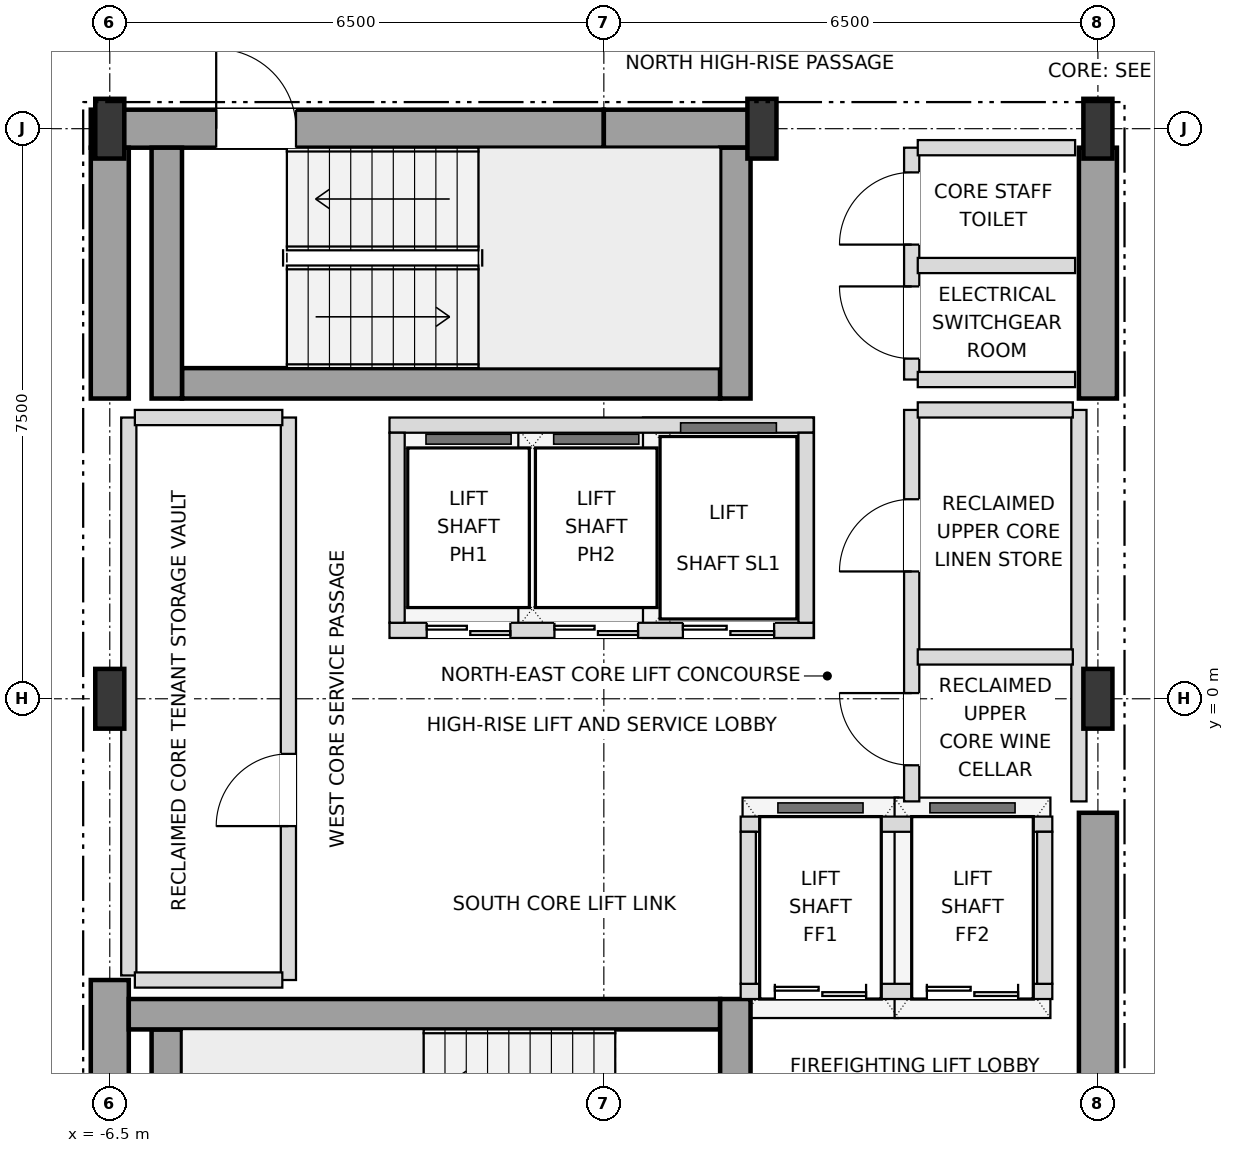
"""IFC4 building model, lengths in metres.
Left out: names, types, materials, properties, quantities, classifications, styles, units other than length and angle.
Written with IfcOpenShell. Run it as: python <this file> out.ifc"""

import sys

from ifc_helpers import new_model, si_unit, direction, frame, frame_2d, origin, origin_2d, place, context, subcontext, project, spatial, rectangle, i_section, extrude, element, fill, save


model = new_model("IFC4")
c1 = context("Model", 3, precision=1e-05, world=origin(), true_north=direction((0.0, 1.0)))
c2 = subcontext(c1, "Body", "Model", "MODEL_VIEW")
j1 = project(units=[si_unit("LENGTHUNIT", "METRE"), si_unit("PLANEANGLEUNIT", "RADIAN")], contexts=[c1])
p1 = place(None, origin())
s1 = spatial("IfcSite", under=j1, at=p1, CompositionType="ELEMENT")
p2 = place(p1, origin())
s2 = spatial("IfcBuilding", under=s1, at=p2, CompositionType="ELEMENT")
p3 = place(p2, frame((0.0, 0.0, 225.9)))
s3 = spatial("IfcBuildingStorey", under=s2, at=p3, CompositionType="ELEMENT", Elevation=225.9)
for number, where, z_axis, x_axis in (
    (1, (-6.5, 0.0, 0.0), (0.0, 0.0, 1.0), (1.0, 0.0, 0.0)),
    (2, (6.5, 0.0, 0.0), (0.0, 0.0, 1.0), (1.0, 0.0, 0.0)),
    (3, (-6.5, 7.5, 0.0), (0.0, 0.0, 1.0), (1.0, 0.0, 0.0)),
    (4, (2.08, 7.5, 0.0), (0.0, 0.0, 1.0), (1.0, 0.0, 0.0)),
    (5, (6.5, 7.5, 0.0), (0.0, 0.0, 1.0), (1.0, 0.0, 0.0)),
):
    element("IfcColumn", number, at=place(p3, frame(where, z_axis=z_axis, x_axis=x_axis)), inside=s3, PredefinedType="COLUMN", context=c2, shape_type="SweptSolid", body=[
        extrude(i_section(OverallWidth=0.382, OverallDepth=0.786, WebThickness=0.02, FlangeThickness=0.033, at=origin_2d()), origin(), (0.0, 0.0, 1.0), 3.6),
    ])
p4 = place(p3, frame((-6.75, 7.5, 0.0), z_axis=(0.0, 0.0, 1.0), x_axis=(1.0, 0.0, 0.0)))
e6 = element("IfcWall", 6, at=p4, inside=s3, PredefinedType="SHEAR", context=c2, shape_type="SweptSolid", body=[
    extrude(rectangle(XDim=6.75, YDim=0.5, at=frame_2d((3.375, 0.0))), origin(), (0.0, 0.0, 1.0), 3.38),
])
p5 = place(p4, frame((1.65, 0.0, 0.0)))
e7 = element("IfcOpeningElement", 7, at=p5, cuts=e6, PredefinedType="OPENING", context=c2, shape_type="SweptSolid", body=[
    extrude(rectangle(XDim=1.05, YDim=2.15, at=frame_2d((0.525, 1.075))), frame((0.0, 0.26, 0.0), z_axis=(0.0, -1.0, 0.0), x_axis=(1.0, 0.0, 0.0)), (0.0, 0.0, 1.0), 0.52),
])
p6 = place(p3, frame((0.0, 7.5, 0.0), z_axis=(0.0, 0.0, 1.0), x_axis=(1.0, 0.0, 0.0)))
e8 = element("IfcWall", 8, at=p6, inside=s3, PredefinedType="SHEAR", context=c2, shape_type="SweptSolid", body=[
    extrude(rectangle(XDim=2.08, YDim=0.5, at=frame_2d((1.04, 0.0))), origin(), (0.0, 0.0, 1.0), 3.38),
])
p7 = place(p3, frame((-6.5, -7.25, 0.0), z_axis=(0.0, 0.0, 1.0), x_axis=(0.0, 1.0, 0.0)))
e9 = element("IfcWall", 9, at=p7, inside=s3, PredefinedType="SHEAR", context=c2, shape_type="SweptSolid", body=[
    extrude(rectangle(XDim=3.55, YDim=0.5, at=frame_2d((1.775, 0.0))), origin(), (0.0, 0.0, 1.0), 3.38),
])
p8 = place(p3, frame((-6.5, 3.95, 0.0), z_axis=(0.0, 0.0, 1.0), x_axis=(0.0, 1.0, 0.0)))
e10 = element("IfcWall", 10, at=p8, inside=s3, PredefinedType="SHEAR", context=c2, shape_type="SweptSolid", body=[
    extrude(rectangle(XDim=3.3, YDim=0.5, at=frame_2d((1.65, 0.0))), origin(), (0.0, 0.0, 1.0), 3.38),
])
p9 = place(p3, frame((6.5, -7.25, 0.0), z_axis=(0.0, 0.0, 1.0), x_axis=(0.0, 1.0, 0.0)))
e11 = element("IfcWall", 11, at=p9, inside=s3, PredefinedType="SHEAR", context=c2, shape_type="SweptSolid", body=[
    extrude(rectangle(XDim=5.75, YDim=0.5, at=frame_2d((2.875, 0.0))), origin(), (0.0, 0.0, 1.0), 3.38),
])
p10 = place(p9, frame((0.85, 0.0, 0.0)))
e12 = element("IfcOpeningElement", 12, at=p10, cuts=e11, PredefinedType="OPENING", context=c2, shape_type="SweptSolid", body=[
    extrude(rectangle(XDim=1.05, YDim=2.15, at=frame_2d((0.525, 1.075))), frame((0.0, 0.26, 0.0), z_axis=(0.0, -1.0, 0.0), x_axis=(1.0, 0.0, 0.0)), (0.0, 0.0, 1.0), 0.52),
])
p11 = place(p3, frame((6.5, 3.95, 0.0), z_axis=(0.0, 0.0, 1.0), x_axis=(0.0, 1.0, 0.0)))
e13 = element("IfcWall", 13, at=p11, inside=s3, PredefinedType="SHEAR", context=c2, shape_type="SweptSolid", body=[
    extrude(rectangle(XDim=3.3, YDim=0.5, at=frame_2d((1.65, 0.0))), origin(), (0.0, 0.0, 1.0), 3.38),
])
p12 = place(p3, frame((-5.75, -7.25, 0.0), z_axis=(0.0, 0.0, 1.0), x_axis=(0.0, 1.0, 0.0)))
e14 = element("IfcWall", 14, at=p12, inside=s3, PredefinedType="SHEAR", context=c2, shape_type="SweptSolid", body=[
    extrude(rectangle(XDim=2.9, YDim=0.4, at=frame_2d((1.45, 0.0))), origin(), (0.0, 0.0, 1.0), 3.38),
])
p13 = place(p3, frame((-6.25, -4.15, 0.0), z_axis=(0.0, 0.0, 1.0), x_axis=(1.0, 0.0, 0.0)))
e15 = element("IfcWall", 15, at=p13, inside=s3, PredefinedType="SHEAR", context=c2, shape_type="SweptSolid", body=[
    extrude(rectangle(XDim=7.78, YDim=0.4, at=frame_2d((3.89, 0.0))), origin(), (0.0, 0.0, 1.0), 3.38),
])
p14 = place(p3, frame((1.73, -7.25, 0.0), z_axis=(0.0, 0.0, 1.0), x_axis=(0.0, 1.0, 0.0)))
e16 = element("IfcWall", 16, at=p14, inside=s3, PredefinedType="SHEAR", context=c2, shape_type="SweptSolid", body=[
    extrude(rectangle(XDim=3.3, YDim=0.4, at=frame_2d((1.65, 0.0))), origin(), (0.0, 0.0, 1.0), 3.38),
])
p15 = place(p14, frame((0.9, 0.0, 0.0)))
e17 = element("IfcOpeningElement", 17, at=p15, cuts=e16, PredefinedType="OPENING", context=c2, shape_type="SweptSolid", body=[
    extrude(rectangle(XDim=1.05, YDim=2.15, at=frame_2d((0.525, 1.075))), frame((0.0, 0.21, 0.0), z_axis=(0.0, -1.0, 0.0), x_axis=(1.0, 0.0, 0.0)), (0.0, 0.0, 1.0), 0.42),
])
p16 = place(p3, frame((-5.55, 4.15, 0.0), z_axis=(0.0, 0.0, 1.0), x_axis=(1.0, 0.0, 0.0)))
e18 = element("IfcWall", 18, at=p16, inside=s3, PredefinedType="SHEAR", context=c2, shape_type="SweptSolid", body=[
    extrude(rectangle(XDim=7.08, YDim=0.4, at=frame_2d((3.54, 0.0))), origin(), (0.0, 0.0, 1.0), 3.38),
])
for number, where, z_axis, x_axis in (
    (19, (1.73, 3.95, 0.0), (0.0, 0.0, 1.0), (0.0, 1.0, 0.0)),
    (20, (-5.75, 3.95, 0.0), (0.0, 0.0, 1.0), (0.0, 1.0, 0.0)),
):
    element("IfcWall", number, at=place(p3, frame(where, z_axis=z_axis, x_axis=x_axis)), inside=s3, PredefinedType="SHEAR", context=c2, shape_type="SweptSolid", body=[
        extrude(rectangle(XDim=3.3, YDim=0.4, at=frame_2d((1.65, 0.0))), origin(), (0.0, 0.0, 1.0), 3.38),
    ])
p17 = place(p3, frame((-2.82, 0.9, 0.0), z_axis=(0.0, 0.0, 1.0), x_axis=(1.0, 0.0, 0.0)))
e21 = element("IfcWall", 21, at=p17, inside=s3, PredefinedType="SOLIDWALL", context=c2, shape_type="SweptSolid", body=[
    extrude(rectangle(XDim=5.58, YDim=0.2, at=frame_2d((2.79, 0.0))), origin(), (0.0, 0.0, 1.0), 3.38),
])
p18 = place(p17, frame((0.49, 0.0, 0.0)))
e22 = element("IfcOpeningElement", 22, at=p18, cuts=e21, PredefinedType="OPENING", context=c2, shape_type="SweptSolid", body=[
    extrude(rectangle(XDim=1.1, YDim=2.15, at=frame_2d((0.55, 1.075))), frame((0.0, 0.11, 0.0), z_axis=(0.0, -1.0, 0.0), x_axis=(1.0, 0.0, 0.0)), (0.0, 0.0, 1.0), 0.22),
])
p19 = place(p17, frame((2.17, 0.0, 0.0)))
e23 = element("IfcOpeningElement", 23, at=p19, cuts=e21, PredefinedType="OPENING", context=c2, shape_type="SweptSolid", body=[
    extrude(rectangle(XDim=1.1, YDim=2.15, at=frame_2d((0.55, 1.075))), frame((0.0, 0.11, 0.0), z_axis=(0.0, -1.0, 0.0), x_axis=(1.0, 0.0, 0.0)), (0.0, 0.0, 1.0), 0.22),
])
p20 = place(p17, frame((3.86, 0.0, 0.0)))
e24 = element("IfcOpeningElement", 24, at=p20, cuts=e21, PredefinedType="OPENING", context=c2, shape_type="SweptSolid", body=[
    extrude(rectangle(XDim=1.2, YDim=2.2, at=frame_2d((0.6, 1.1))), frame((0.0, 0.11, 0.0), z_axis=(0.0, -1.0, 0.0), x_axis=(1.0, 0.0, 0.0)), (0.0, 0.0, 1.0), 0.22),
])
p21 = place(p3, frame((-2.82, 3.6, 0.0), z_axis=(0.0, 0.0, 1.0), x_axis=(1.0, 0.0, 0.0)))
e25 = element("IfcWall", 25, at=p21, inside=s3, PredefinedType="SOLIDWALL", context=c2, shape_type="SweptSolid", body=[
    extrude(rectangle(XDim=5.58, YDim=0.2, at=frame_2d((2.79, 0.0))), origin(), (0.0, 0.0, 1.0), 3.38),
])
for number, where, z_axis, x_axis in (
    (26, (-2.72, 1.0, 0.0), (0.0, 0.0, 1.0), (0.0, 1.0, 0.0)),
    (27, (2.66, 1.0, 0.0), (0.0, 0.0, 1.0), (0.0, 1.0, 0.0)),
):
    element("IfcWall", number, at=place(p3, frame(where, z_axis=z_axis, x_axis=x_axis)), inside=s3, PredefinedType="SOLIDWALL", context=c2, shape_type="SweptSolid", body=[
        extrude(rectangle(XDim=2.5, YDim=0.2, at=frame_2d((1.25, 0.0))), origin(), (0.0, 0.0, 1.0), 3.38),
    ])
p22 = place(p3, frame((1.8, -3.85, 0.0), z_axis=(0.0, 0.0, 1.0), x_axis=(1.0, 0.0, 0.0)))
e28 = element("IfcWall", 28, at=p22, inside=s3, PredefinedType="SOLIDWALL", context=c2, shape_type="SweptSolid", body=[
    extrude(rectangle(XDim=4.1, YDim=0.2, at=frame_2d((2.05, 0.0))), origin(), (0.0, 0.0, 1.0), 3.38),
])
p23 = place(p22, frame((0.45, 0.0, 0.0)))
e29 = element("IfcOpeningElement", 29, at=p23, cuts=e28, PredefinedType="OPENING", context=c2, shape_type="SweptSolid", body=[
    extrude(rectangle(XDim=1.2, YDim=2.2, at=frame_2d((0.6, 1.1))), frame((0.0, 0.11, 0.0), z_axis=(0.0, -1.0, 0.0), x_axis=(1.0, 0.0, 0.0)), (0.0, 0.0, 1.0), 0.22),
])
p24 = place(p22, frame((2.45, 0.0, 0.0)))
e30 = element("IfcOpeningElement", 30, at=p24, cuts=e28, PredefinedType="OPENING", context=c2, shape_type="SweptSolid", body=[
    extrude(rectangle(XDim=1.2, YDim=2.2, at=frame_2d((0.6, 1.1))), frame((0.0, 0.11, 0.0), z_axis=(0.0, -1.0, 0.0), x_axis=(1.0, 0.0, 0.0)), (0.0, 0.0, 1.0), 0.22),
])
p25 = place(p3, frame((1.8, -1.65, 0.0), z_axis=(0.0, 0.0, 1.0), x_axis=(1.0, 0.0, 0.0)))
e31 = element("IfcWall", 31, at=p25, inside=s3, PredefinedType="SOLIDWALL", context=c2, shape_type="SweptSolid", body=[
    extrude(rectangle(XDim=4.1, YDim=0.2, at=frame_2d((2.05, 0.0))), origin(), (0.0, 0.0, 1.0), 3.38),
])
for number, where, z_axis, x_axis in (
    (32, (1.9, -3.75, 0.0), (0.0, 0.0, 1.0), (0.0, 1.0, 0.0)),
    (33, (5.8, -3.75, 0.0), (0.0, 0.0, 1.0), (0.0, 1.0, 0.0)),
):
    element("IfcWall", number, at=place(p3, frame(where, z_axis=z_axis, x_axis=x_axis)), inside=s3, PredefinedType="SOLIDWALL", context=c2, shape_type="SweptSolid", body=[
        extrude(rectangle(XDim=2.0, YDim=0.2, at=frame_2d((1.0, 0.0))), origin(), (0.0, 0.0, 1.0), 3.38),
    ])
p26 = place(p3, frame((-6.25, -3.64, 0.0), z_axis=(0.0, 0.0, 1.0), x_axis=(0.0, 1.0, 0.0)))
e34 = element("IfcWall", 34, at=p26, inside=s3, PredefinedType="SOLIDWALL", context=c2, shape_type="SweptSolid", body=[
    extrude(rectangle(XDim=7.34, YDim=0.2, at=frame_2d((3.67, 0.0))), origin(), (0.0, 0.0, 1.0), 3.38),
])
p27 = place(p3, frame((-4.15, -3.7, 0.0), z_axis=(0.0, 0.0, 1.0), x_axis=(0.0, 1.0, 0.0)))
e35 = element("IfcWall", 35, at=p27, inside=s3, PredefinedType="SOLIDWALL", context=c2, shape_type="SweptSolid", body=[
    extrude(rectangle(XDim=7.4, YDim=0.2, at=frame_2d((3.7, 0.0))), origin(), (0.0, 0.0, 1.0), 3.38),
])
p28 = place(p27, frame((2.025, 0.0, 0.0)))
e36 = element("IfcOpeningElement", 36, at=p28, cuts=e35, PredefinedType="OPENING", context=c2, shape_type="SweptSolid", body=[
    extrude(rectangle(XDim=0.95, YDim=2.15, at=frame_2d((0.475, 1.075))), frame((0.0, 0.11, 0.0), z_axis=(0.0, -1.0, 0.0), x_axis=(1.0, 0.0, 0.0)), (0.0, 0.0, 1.0), 0.22),
])
p29 = place(p3, frame((4.05, -1.35, 0.0), z_axis=(0.0, 0.0, 1.0), x_axis=(0.0, 1.0, 0.0)))
e37 = element("IfcWall", 37, at=p29, inside=s3, PredefinedType="SOLIDWALL", context=c2, shape_type="SweptSolid", body=[
    extrude(rectangle(XDim=5.15, YDim=0.2, at=frame_2d((2.575, 0.0))), origin(), (0.0, 0.0, 1.0), 3.38),
])
p30 = place(p29, frame((0.475, 0.0, 0.0)))
e38 = element("IfcOpeningElement", 38, at=p30, cuts=e37, PredefinedType="OPENING", context=c2, shape_type="SweptSolid", body=[
    extrude(rectangle(XDim=0.95, YDim=2.15, at=frame_2d((0.475, 1.075))), frame((0.0, 0.11, 0.0), z_axis=(0.0, -1.0, 0.0), x_axis=(1.0, 0.0, 0.0)), (0.0, 0.0, 1.0), 0.22),
])
p31 = place(p29, frame((3.025, 0.0, 0.0)))
e39 = element("IfcOpeningElement", 39, at=p31, cuts=e37, PredefinedType="OPENING", context=c2, shape_type="SweptSolid", body=[
    extrude(rectangle(XDim=0.95, YDim=2.15, at=frame_2d((0.475, 1.075))), frame((0.0, 0.11, 0.0), z_axis=(0.0, -1.0, 0.0), x_axis=(1.0, 0.0, 0.0)), (0.0, 0.0, 1.0), 0.22),
])
p32 = place(p3, frame((4.05, 4.2, 0.0), z_axis=(0.0, 0.0, 1.0), x_axis=(0.0, 1.0, 0.0)))
e40 = element("IfcWall", 40, at=p32, inside=s3, PredefinedType="SOLIDWALL", context=c2, shape_type="SweptSolid", body=[
    extrude(rectangle(XDim=3.05, YDim=0.2, at=frame_2d((1.525, 0.0))), origin(), (0.0, 0.0, 1.0), 3.38),
])
p33 = place(p32, frame((0.275, 0.0, 0.0)))
e41 = element("IfcOpeningElement", 41, at=p33, cuts=e40, PredefinedType="OPENING", context=c2, shape_type="SweptSolid", body=[
    extrude(rectangle(XDim=0.95, YDim=2.15, at=frame_2d((0.475, 1.075))), frame((0.0, 0.11, 0.0), z_axis=(0.0, -1.0, 0.0), x_axis=(1.0, 0.0, 0.0)), (0.0, 0.0, 1.0), 0.22),
])
p34 = place(p32, frame((1.775, 0.0, 0.0)))
e42 = element("IfcOpeningElement", 42, at=p34, cuts=e40, PredefinedType="OPENING", context=c2, shape_type="SweptSolid", body=[
    extrude(rectangle(XDim=0.95, YDim=2.15, at=frame_2d((0.475, 1.075))), frame((0.0, 0.11, 0.0), z_axis=(0.0, -1.0, 0.0), x_axis=(1.0, 0.0, 0.0)), (0.0, 0.0, 1.0), 0.22),
])
p35 = place(p3, frame((6.25, -1.35, 0.0), z_axis=(0.0, 0.0, 1.0), x_axis=(0.0, 1.0, 0.0)))
e43 = element("IfcWall", 43, at=p35, inside=s3, PredefinedType="SOLIDWALL", context=c2, shape_type="SweptSolid", body=[
    extrude(rectangle(XDim=5.15, YDim=0.2, at=frame_2d((2.575, 0.0))), origin(), (0.0, 0.0, 1.0), 3.38),
])
p36 = place(p3, frame((-6.17, -3.7, 0.0), z_axis=(0.0, 0.0, 1.0), x_axis=(1.0, 0.0, 0.0)))
e44 = element("IfcWall", 44, at=p36, inside=s3, PredefinedType="SOLIDWALL", context=c2, shape_type="SweptSolid", body=[
    extrude(rectangle(XDim=1.94, YDim=0.2, at=frame_2d((0.97, 0.0))), origin(), (0.0, 0.0, 1.0), 3.38),
])
p37 = place(p3, frame((4.13, 0.55, 0.0), z_axis=(0.0, 0.0, 1.0), x_axis=(1.0, 0.0, 0.0)))
e45 = element("IfcWall", 45, at=p37, inside=s3, PredefinedType="SOLIDWALL", context=c2, shape_type="SweptSolid", body=[
    extrude(rectangle(XDim=2.04, YDim=0.2, at=frame_2d((1.02, 0.0))), origin(), (0.0, 0.0, 1.0), 3.38),
])
p38 = place(p3, frame((-6.17, 3.7, 0.0), z_axis=(0.0, 0.0, 1.0), x_axis=(1.0, 0.0, 0.0)))
e46 = element("IfcWall", 46, at=p38, inside=s3, PredefinedType="SOLIDWALL", context=c2, shape_type="SweptSolid", body=[
    extrude(rectangle(XDim=1.94, YDim=0.2, at=frame_2d((0.97, 0.0))), origin(), (0.0, 0.0, 1.0), 3.38),
])
p39 = place(p3, frame((4.13, 3.8, 0.0), z_axis=(0.0, 0.0, 1.0), x_axis=(1.0, 0.0, 0.0)))
e47 = element("IfcWall", 47, at=p39, inside=s3, PredefinedType="SOLIDWALL", context=c2, shape_type="SweptSolid", body=[
    extrude(rectangle(XDim=2.04, YDim=0.2, at=frame_2d((1.02, 0.0))), origin(), (0.0, 0.0, 1.0), 3.38),
])
for number, where, z_axis, x_axis in (
    (48, (4.13, 4.2, 0.0), (0.0, 0.0, 1.0), (1.0, 0.0, 0.0)),
    (49, (4.13, 5.7, 0.0), (0.0, 0.0, 1.0), (1.0, 0.0, 0.0)),
    (50, (4.13, 7.25, 0.0), (0.0, 0.0, 1.0), (1.0, 0.0, 0.0)),
):
    element("IfcWall", number, at=place(p3, frame(where, z_axis=z_axis, x_axis=x_axis)), inside=s3, PredefinedType="SOLIDWALL", context=c2, shape_type="SweptSolid", body=[
        extrude(rectangle(XDim=2.07, YDim=0.2, at=frame_2d((1.035, 0.0))), origin(), (0.0, 0.0, 1.0), 3.38),
    ])
p40 = place(p5, origin())
e51 = element("IfcDoor", 51, at=p40, inside=s3, OperationType="SINGLE_SWING_LEFT", PredefinedType="DOOR", context=c2, shape_type="SweptSolid", body=[
    extrude(rectangle(XDim=1.05, YDim=2.15, at=frame_2d((0.525, 1.075))), frame((0.0, 0.025, 0.0), z_axis=(0.0, -1.0, 0.0), x_axis=(1.0, 0.0, 0.0)), (0.0, 0.0, 1.0), 0.05),
])
fill(e7, e51)
p41 = place(p18, origin())
e52 = element("IfcDoor", 52, at=p41, inside=s3, OperationType="DOUBLE_DOOR_SLIDING", PredefinedType="DOOR", context=c2, shape_type="SweptSolid", body=[
    extrude(rectangle(XDim=1.1, YDim=2.15, at=frame_2d((0.55, 1.075))), frame((0.0, 0.025, 0.0), z_axis=(0.0, -1.0, 0.0), x_axis=(1.0, 0.0, 0.0)), (0.0, 0.0, 1.0), 0.05),
])
fill(e22, e52)
p42 = place(p19, origin())
e53 = element("IfcDoor", 53, at=p42, inside=s3, OperationType="DOUBLE_DOOR_SLIDING", PredefinedType="DOOR", context=c2, shape_type="SweptSolid", body=[
    extrude(rectangle(XDim=1.1, YDim=2.15, at=frame_2d((0.55, 1.075))), frame((0.0, 0.025, 0.0), z_axis=(0.0, -1.0, 0.0), x_axis=(1.0, 0.0, 0.0)), (0.0, 0.0, 1.0), 0.05),
])
fill(e23, e53)
p43 = place(p20, origin())
e54 = element("IfcDoor", 54, at=p43, inside=s3, OperationType="DOUBLE_DOOR_SLIDING", PredefinedType="DOOR", context=c2, shape_type="SweptSolid", body=[
    extrude(rectangle(XDim=1.2, YDim=2.2, at=frame_2d((0.6, 1.1))), frame((0.0, 0.025, 0.0), z_axis=(0.0, -1.0, 0.0), x_axis=(1.0, 0.0, 0.0)), (0.0, 0.0, 1.0), 0.05),
])
fill(e24, e54)
p44 = place(p23, origin())
e55 = element("IfcDoor", 55, at=p44, inside=s3, OperationType="DOUBLE_DOOR_SLIDING", PredefinedType="DOOR", context=c2, shape_type="SweptSolid", body=[
    extrude(rectangle(XDim=1.2, YDim=2.2, at=frame_2d((0.6, 1.1))), frame((0.0, 0.025, 0.0), z_axis=(0.0, -1.0, 0.0), x_axis=(1.0, 0.0, 0.0)), (0.0, 0.0, 1.0), 0.05),
])
fill(e29, e55)
p45 = place(p24, origin())
e56 = element("IfcDoor", 56, at=p45, inside=s3, OperationType="DOUBLE_DOOR_SLIDING", PredefinedType="DOOR", context=c2, shape_type="SweptSolid", body=[
    extrude(rectangle(XDim=1.2, YDim=2.2, at=frame_2d((0.6, 1.1))), frame((0.0, 0.025, 0.0), z_axis=(0.0, -1.0, 0.0), x_axis=(1.0, 0.0, 0.0)), (0.0, 0.0, 1.0), 0.05),
])
fill(e30, e56)
p46 = place(p28, origin())
e57 = element("IfcDoor", 57, at=p46, inside=s3, OperationType="SINGLE_SWING_LEFT", PredefinedType="DOOR", context=c2, shape_type="SweptSolid", body=[
    extrude(rectangle(XDim=0.95, YDim=2.15, at=frame_2d((0.475, 1.075))), frame((0.0, 0.025, 0.0), z_axis=(0.0, -1.0, 0.0), x_axis=(1.0, 0.0, 0.0)), (0.0, 0.0, 1.0), 0.05),
])
fill(e36, e57)
p47 = place(p30, origin())
e58 = element("IfcDoor", 58, at=p47, inside=s3, OperationType="SINGLE_SWING_RIGHT", PredefinedType="DOOR", context=c2, shape_type="SweptSolid", body=[
    extrude(rectangle(XDim=0.95, YDim=2.15, at=frame_2d((0.475, 1.075))), frame((0.0, 0.025, 0.0), z_axis=(0.0, -1.0, 0.0), x_axis=(1.0, 0.0, 0.0)), (0.0, 0.0, 1.0), 0.05),
])
fill(e38, e58)
p48 = place(p31, origin())
e59 = element("IfcDoor", 59, at=p48, inside=s3, OperationType="SINGLE_SWING_LEFT", PredefinedType="DOOR", context=c2, shape_type="SweptSolid", body=[
    extrude(rectangle(XDim=0.95, YDim=2.15, at=frame_2d((0.475, 1.075))), frame((0.0, 0.025, 0.0), z_axis=(0.0, -1.0, 0.0), x_axis=(1.0, 0.0, 0.0)), (0.0, 0.0, 1.0), 0.05),
])
fill(e39, e59)
p49 = place(p33, origin())
e60 = element("IfcDoor", 60, at=p49, inside=s3, OperationType="SINGLE_SWING_RIGHT", PredefinedType="DOOR", context=c2, shape_type="SweptSolid", body=[
    extrude(rectangle(XDim=0.95, YDim=2.15, at=frame_2d((0.475, 1.075))), frame((0.0, 0.025, 0.0), z_axis=(0.0, -1.0, 0.0), x_axis=(1.0, 0.0, 0.0)), (0.0, 0.0, 1.0), 0.05),
])
fill(e41, e60)
p50 = place(p34, origin())
e61 = element("IfcDoor", 61, at=p50, inside=s3, OperationType="SINGLE_SWING_LEFT", PredefinedType="DOOR", context=c2, shape_type="SweptSolid", body=[
    extrude(rectangle(XDim=0.95, YDim=2.15, at=frame_2d((0.475, 1.075))), frame((0.0, 0.025, 0.0), z_axis=(0.0, -1.0, 0.0), x_axis=(1.0, 0.0, 0.0)), (0.0, 0.0, 1.0), 0.05),
])
fill(e42, e61)
save(model, sys.argv[1])
